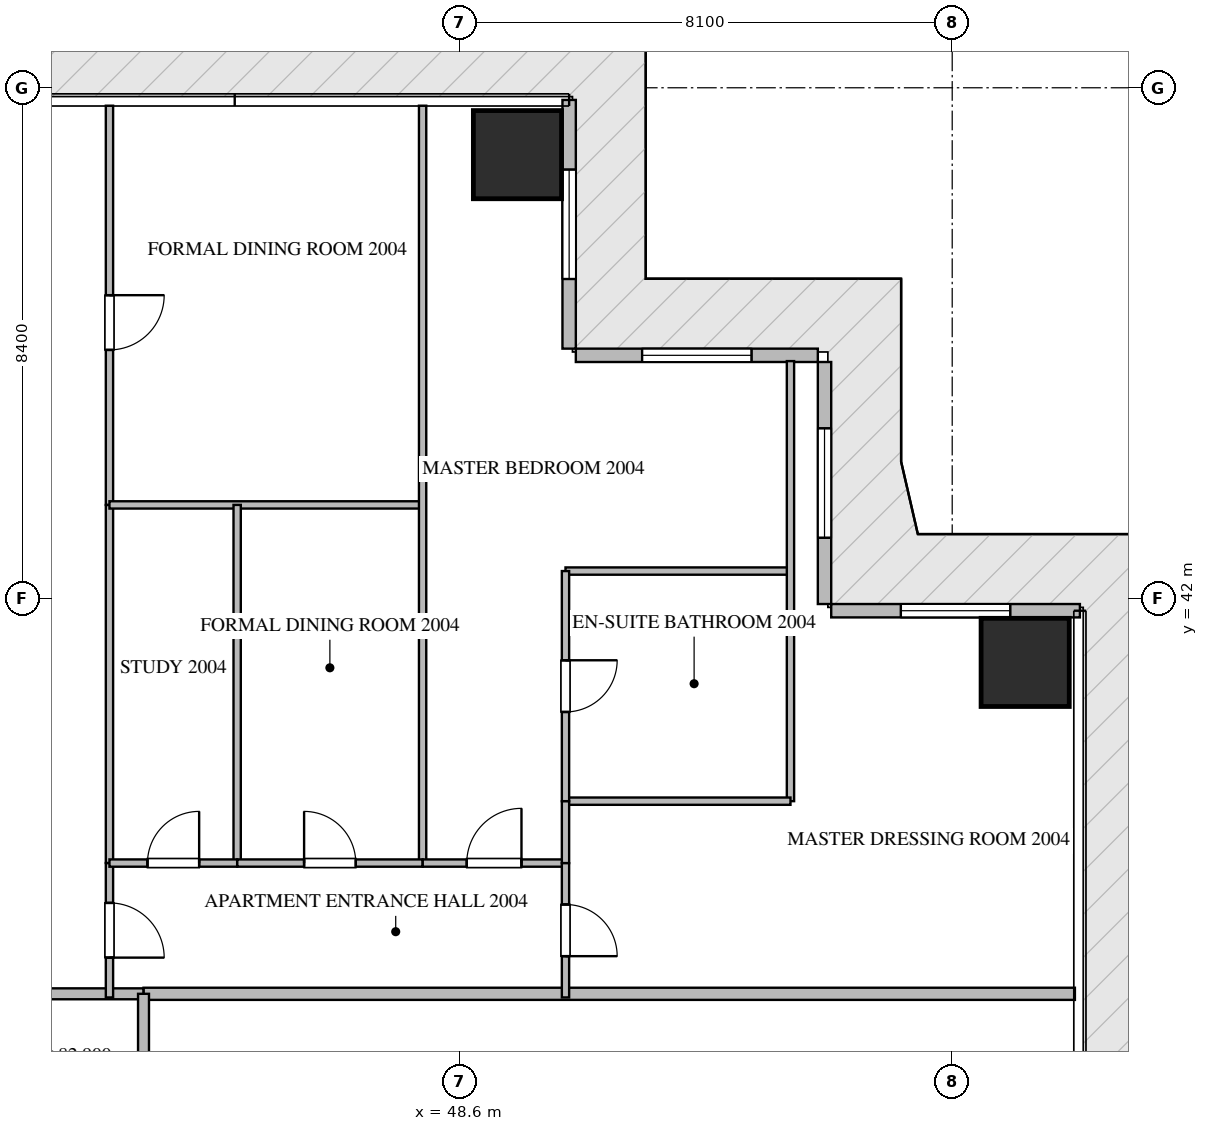
"""IFC4 building model, lengths in metres.
Left out: names, types, materials, properties, quantities, classifications, styles, units other than length and angle.
Written with IfcOpenShell. Run it as: python <this file> out.ifc"""

import sys

from ifc_helpers import new_model, si_unit, direction, frame, frame_2d, origin, origin_2d, place, context, subcontext, project, spatial, rectangle, extrude, source, transform, mapped, element, fill, save


model = new_model("IFC4")
c1 = context("Model", 3, precision=1e-05, world=origin(), true_north=direction((0.0, 1.0)))
c2 = subcontext(c1, "Body", "Model", "MODEL_VIEW")
j1 = project(units=[si_unit("LENGTHUNIT", "METRE"), si_unit("PLANEANGLEUNIT", "RADIAN")], contexts=[c1])
p1 = place(None, origin())
s1 = spatial("IfcSite", under=j1, at=p1, CompositionType="ELEMENT")
p2 = place(p1, origin())
s2 = spatial("IfcBuilding", under=s1, at=p2, CompositionType="ELEMENT")
p3 = place(p2, frame((0.0, 0.0, 82.95)))
s3 = spatial("IfcBuildingStorey", under=s2, at=p3, CompositionType="ELEMENT", Elevation=82.95)
m1 = source(origin(), c2, "Body", "SweptSolid", [
    extrude(rectangle(XDim=1.45, YDim=1.45, at=origin_2d()), origin(), (0.0, 0.0, 1.0), 3.75),
])
for number, where, z_axis, x_axis in (
    (1, (49.55, 49.3, -0.26), (0.0, 0.0, 1.0), (1.0, 0.0, 0.0)),
    (2, (57.9, 40.95, -0.26), (0.0, 0.0, 1.0), (1.0, 0.0, 0.0)),
):
    element("IfcColumn", number, at=place(p3, frame(where, z_axis=z_axis, x_axis=x_axis)), inside=s3, PredefinedType="COLUMN", context=c2, shape_type="MappedRepresentation", body=[
        mapped(m1, transform((0.0, 0.0, 0.0), scale=1.0)),
    ])
p4 = place(p3, frame((58.8, 41.8, 0.0), z_axis=(0.0, 0.0, 1.0), x_axis=(-1.0, 0.0, 0.0)))
e3 = element("IfcWall", 3, at=p4, inside=s3, PredefinedType="ELEMENTEDWALL", context=c2, shape_type="SweptSolid", body=[
    extrude(rectangle(XDim=4.09, YDim=0.22, at=frame_2d((2.045, 0.0))), origin(), (0.0, 0.0, 1.0), 3.475),
])
p5 = place(p4, frame((1.145, 0.0, 0.65)))
e4 = element("IfcOpeningElement", 4, at=p5, cuts=e3, PredefinedType="OPENING", context=c2, shape_type="SweptSolid", body=[
    extrude(rectangle(XDim=1.8, YDim=2.1, at=frame_2d((0.9, 1.05))), frame((0.0, 0.12, 0.0), z_axis=(0.0, -1.0, 0.0), x_axis=(1.0, 0.0, 0.0)), (0.0, 0.0, 1.0), 0.24),
])
p6 = place(p3, frame((54.6, 41.91, 0.0), z_axis=(0.0, 0.0, 1.0), x_axis=(0.0, 1.0, 0.0)))
e5 = element("IfcWall", 5, at=p6, inside=s3, PredefinedType="ELEMENTEDWALL", context=c2, shape_type="SweptSolid", body=[
    extrude(rectangle(XDim=3.98, YDim=0.22, at=frame_2d((1.99, 0.0))), origin(), (0.0, 0.0, 1.0), 3.475),
])
p7 = place(p6, frame((1.09, 0.0, 0.65)))
e6 = element("IfcOpeningElement", 6, at=p7, cuts=e5, PredefinedType="OPENING", context=c2, shape_type="SweptSolid", body=[
    extrude(rectangle(XDim=1.8, YDim=2.1, at=frame_2d((0.9, 1.05))), frame((0.0, 0.12, 0.0), z_axis=(0.0, -1.0, 0.0), x_axis=(1.0, 0.0, 0.0)), (0.0, 0.0, 1.0), 0.24),
])
p8 = place(p3, frame((54.49, 46.0, 0.0), z_axis=(0.0, 0.0, 1.0), x_axis=(-1.0, 0.0, 0.0)))
e7 = element("IfcWall", 7, at=p8, inside=s3, PredefinedType="ELEMENTEDWALL", context=c2, shape_type="SweptSolid", body=[
    extrude(rectangle(XDim=3.98, YDim=0.22, at=frame_2d((1.99, 0.0))), origin(), (0.0, 0.0, 1.0), 3.475),
])
p9 = place(p8, frame((1.09, 0.0, 0.65)))
e8 = element("IfcOpeningElement", 8, at=p9, cuts=e7, PredefinedType="OPENING", context=c2, shape_type="SweptSolid", body=[
    extrude(rectangle(XDim=1.8, YDim=2.1, at=frame_2d((0.9, 1.05))), frame((0.0, 0.12, 0.0), z_axis=(0.0, -1.0, 0.0), x_axis=(1.0, 0.0, 0.0)), (0.0, 0.0, 1.0), 0.24),
])
p10 = place(p3, frame((50.4, 46.11, 0.0), z_axis=(0.0, 0.0, 1.0), x_axis=(0.0, 1.0, 0.0)))
e9 = element("IfcWall", 9, at=p10, inside=s3, PredefinedType="ELEMENTEDWALL", context=c2, shape_type="SweptSolid", body=[
    extrude(rectangle(XDim=4.09, YDim=0.22, at=frame_2d((2.045, 0.0))), origin(), (0.0, 0.0, 1.0), 3.475),
])
p11 = place(p10, frame((1.145, 0.0, 0.65)))
e10 = element("IfcOpeningElement", 10, at=p11, cuts=e9, PredefinedType="OPENING", context=c2, shape_type="SweptSolid", body=[
    extrude(rectangle(XDim=1.8, YDim=2.1, at=frame_2d((0.9, 1.05))), frame((0.0, 0.12, 0.0), z_axis=(0.0, -1.0, 0.0), x_axis=(1.0, 0.0, 0.0)), (0.0, 0.0, 1.0), 0.24),
])
p12 = place(p3, frame((43.4, 35.5, 0.0), z_axis=(0.0, 0.0, 1.0), x_axis=(1.0, 0.0, 0.0)))
e11 = element("IfcWall", 11, at=p12, inside=s3, PredefinedType="PARTITIONING", context=c2, shape_type="SweptSolid", body=[
    extrude(rectangle(XDim=15.318, YDim=0.2, at=frame_2d((7.659, 0.0))), origin(), (0.0, 0.0, 1.0), 3.49),
])
p13 = place(p3, frame((21.402, 35.5, 0.0), z_axis=(0.0, 0.0, 1.0), x_axis=(1.0, 0.0, 0.0)))
e12 = element("IfcWall", 12, at=p13, inside=s3, PredefinedType="PARTITIONING", context=c2, shape_type="SweptSolid", body=[
    extrude(rectangle(XDim=21.996, YDim=0.18, at=frame_2d((10.998, 0.0))), origin(), (0.0, 0.0, 1.0), 3.49),
])
p14 = place(p13, frame((4.724, 0.0, 0.0)))
e13 = element("IfcOpeningElement", 13, at=p14, cuts=e12, PredefinedType="OPENING", context=c2, shape_type="SweptSolid", body=[
    extrude(rectangle(XDim=1.0, YDim=2.15, at=frame_2d((0.5, 1.075))), frame((0.0, 0.1, 0.0), z_axis=(0.0, -1.0, 0.0), x_axis=(1.0, 0.0, 0.0)), (0.0, 0.0, 1.0), 0.2),
])
p15 = place(p13, frame((18.77, 0.0, 0.0)))
e14 = element("IfcOpeningElement", 14, at=p15, cuts=e12, PredefinedType="OPENING", context=c2, shape_type="SweptSolid", body=[
    extrude(rectangle(XDim=1.0, YDim=2.15, at=frame_2d((0.5, 1.075))), frame((0.0, 0.1, 0.0), z_axis=(0.0, -1.0, 0.0), x_axis=(1.0, 0.0, 0.0)), (0.0, 0.0, 1.0), 0.2),
])
p16 = place(p3, frame((43.4, 14.9, 0.0), z_axis=(0.0, 0.0, 1.0), x_axis=(0.0, 1.0, 0.0)))
e15 = element("IfcWall", 15, at=p16, inside=s3, PredefinedType="PARTITIONING", context=c2, shape_type="SweptSolid", body=[
    extrude(rectangle(XDim=20.6, YDim=0.18, at=frame_2d((10.3, 0.0))), origin(), (0.0, 0.0, 1.0), 3.49),
])
p17 = place(p16, frame((1.82, 0.0, 0.0)))
e16 = element("IfcOpeningElement", 16, at=p17, cuts=e15, PredefinedType="OPENING", context=c2, shape_type="SweptSolid", body=[
    extrude(rectangle(XDim=1.0, YDim=2.15, at=frame_2d((0.5, 1.075))), frame((0.0, 0.1, 0.0), z_axis=(0.0, -1.0, 0.0), x_axis=(1.0, 0.0, 0.0)), (0.0, 0.0, 1.0), 0.2),
])
p18 = place(p16, frame((11.368, 0.0, 0.0)))
e17 = element("IfcOpeningElement", 17, at=p18, cuts=e15, PredefinedType="OPENING", context=c2, shape_type="SweptSolid", body=[
    extrude(rectangle(XDim=1.0, YDim=2.15, at=frame_2d((0.5, 1.075))), frame((0.0, 0.1, 0.0), z_axis=(0.0, -1.0, 0.0), x_axis=(1.0, 0.0, 0.0)), (0.0, 0.0, 1.0), 0.2),
])
p19 = place(p16, frame((18.06, 0.0, 0.0)))
e18 = element("IfcOpeningElement", 18, at=p19, cuts=e15, PredefinedType="OPENING", context=c2, shape_type="SweptSolid", body=[
    extrude(rectangle(XDim=1.0, YDim=2.15, at=frame_2d((0.5, 1.075))), frame((0.0, 0.1, 0.0), z_axis=(0.0, -1.0, 0.0), x_axis=(1.0, 0.0, 0.0)), (0.0, 0.0, 1.0), 0.2),
])
p20 = place(p3, frame((42.84, 37.65, 0.0), z_axis=(0.0, 0.0, 1.0), x_axis=(0.0, -1.0, 0.0)))
e19 = element("IfcWall", 19, at=p20, inside=s3, PredefinedType="PARTITIONING", context=c2, shape_type="SweptSolid", body=[
    extrude(rectangle(XDim=2.21, YDim=0.12, at=frame_2d((1.105, 0.0))), origin(), (0.0, 0.0, 1.0), 3.49),
])
p21 = place(p20, frame((0.655, 0.0, 0.0)))
e20 = element("IfcOpeningElement", 20, at=p21, cuts=e19, PredefinedType="OPENING", context=c2, shape_type="SweptSolid", body=[
    extrude(rectangle(XDim=0.9, YDim=2.1, at=frame_2d((0.45, 1.05))), frame((0.0, 0.07, 0.0), z_axis=(0.0, -1.0, 0.0), x_axis=(1.0, 0.0, 0.0)), (0.0, 0.0, 1.0), 0.14),
])
p22 = place(p3, frame((42.84, 50.105, 0.0), z_axis=(0.0, 0.0, 1.0), x_axis=(0.0, -1.0, 0.0)))
e21 = element("IfcWall", 21, at=p22, inside=s3, PredefinedType="PARTITIONING", context=c2, shape_type="SweptSolid", body=[
    extrude(rectangle(XDim=6.565, YDim=0.12, at=frame_2d((3.282, 0.0))), origin(), (0.0, 0.0, 1.0), 3.49),
])
p23 = place(p22, frame((3.116, 0.0, 0.0)))
e22 = element("IfcOpeningElement", 22, at=p23, cuts=e21, PredefinedType="OPENING", context=c2, shape_type="SweptSolid", body=[
    extrude(rectangle(XDim=0.9, YDim=2.1, at=frame_2d((0.45, 1.05))), frame((0.0, 0.07, 0.0), z_axis=(0.0, -1.0, 0.0), x_axis=(1.0, 0.0, 0.0)), (0.0, 0.0, 1.0), 0.14),
])
p24 = place(p3, frame((42.84, 43.538, 0.0), z_axis=(0.0, 0.0, 1.0), x_axis=(0.0, -1.0, 0.0)))
e23 = element("IfcWall", 23, at=p24, inside=s3, PredefinedType="PARTITIONING", context=c2, shape_type="SweptSolid", body=[
    extrude(rectangle(XDim=5.886, YDim=0.12, at=frame_2d((2.943, 0.0))), origin(), (0.0, 0.0, 1.0), 3.49),
])
p25 = place(p3, frame((42.84, 43.54, 0.0), z_axis=(0.0, 0.0, 1.0), x_axis=(1.0, 0.0, 0.0)))
e24 = element("IfcWall", 24, at=p25, inside=s3, PredefinedType="PARTITIONING", context=c2, shape_type="SweptSolid", body=[
    extrude(rectangle(XDim=5.15, YDim=0.12, at=frame_2d((2.575, 0.0))), origin(), (0.0, 0.0, 1.0), 3.49),
])
p26 = place(p3, frame((47.99, 50.105, 0.0), z_axis=(0.0, 0.0, 1.0), x_axis=(0.0, -1.0, 0.0)))
e25 = element("IfcWall", 25, at=p26, inside=s3, PredefinedType="PARTITIONING", context=c2, shape_type="SweptSolid", body=[
    extrude(rectangle(XDim=12.455, YDim=0.12, at=frame_2d((6.228, 0.0))), origin(), (0.0, 0.0, 1.0), 3.49),
])
p27 = place(p3, frame((44.94, 43.54, 0.0), z_axis=(0.0, 0.0, 1.0), x_axis=(0.0, -1.0, 0.0)))
e26 = element("IfcWall", 26, at=p27, inside=s3, PredefinedType="PARTITIONING", context=c2, shape_type="SweptSolid", body=[
    extrude(rectangle(XDim=5.89, YDim=0.12, at=frame_2d((2.945, 0.0))), origin(), (0.0, 0.0, 1.0), 3.49),
])
p28 = place(p3, frame((42.84, 37.65, 0.0), z_axis=(0.0, 0.0, 1.0), x_axis=(1.0, 0.0, 0.0)))
e27 = element("IfcWall", 27, at=p28, inside=s3, PredefinedType="PARTITIONING", context=c2, shape_type="SweptSolid", body=[
    extrude(rectangle(XDim=2.1, YDim=0.12, at=frame_2d((1.05, 0.0))), origin(), (0.0, 0.0, 1.0), 3.49),
])
p29 = place(p28, frame((0.625, 0.0, 0.0)))
e28 = element("IfcOpeningElement", 28, at=p29, cuts=e27, PredefinedType="OPENING", context=c2, shape_type="SweptSolid", body=[
    extrude(rectangle(XDim=0.85, YDim=2.1, at=frame_2d((0.425, 1.05))), frame((0.0, 0.07, 0.0), z_axis=(0.0, -1.0, 0.0), x_axis=(1.0, 0.0, 0.0)), (0.0, 0.0, 1.0), 0.14),
])
p30 = place(p3, frame((44.942, 37.65, 0.0), z_axis=(0.0, 0.0, 1.0), x_axis=(1.0, 0.0, 0.0)))
e29 = element("IfcWall", 29, at=p30, inside=s3, PredefinedType="PARTITIONING", context=c2, shape_type="SweptSolid", body=[
    extrude(rectangle(XDim=3.048, YDim=0.12, at=frame_2d((1.524, 0.0))), origin(), (0.0, 0.0, 1.0), 3.49),
])
p31 = place(p30, frame((1.099, 0.0, 0.0)))
e30 = element("IfcOpeningElement", 30, at=p31, cuts=e29, PredefinedType="OPENING", context=c2, shape_type="SweptSolid", body=[
    extrude(rectangle(XDim=0.85, YDim=2.1, at=frame_2d((0.425, 1.05))), frame((0.0, 0.07, 0.0), z_axis=(0.0, -1.0, 0.0), x_axis=(1.0, 0.0, 0.0)), (0.0, 0.0, 1.0), 0.14),
])
p32 = place(p3, frame((47.992, 37.65, 0.0), z_axis=(0.0, 0.0, 1.0), x_axis=(1.0, 0.0, 0.0)))
e31 = element("IfcWall", 31, at=p32, inside=s3, PredefinedType="PARTITIONING", context=c2, shape_type="SweptSolid", body=[
    extrude(rectangle(XDim=2.348, YDim=0.12, at=frame_2d((1.174, 0.0))), origin(), (0.0, 0.0, 1.0), 3.49),
])
p33 = place(p32, frame((0.724, 0.0, 0.0)))
e32 = element("IfcOpeningElement", 32, at=p33, cuts=e31, PredefinedType="OPENING", context=c2, shape_type="SweptSolid", body=[
    extrude(rectangle(XDim=0.9, YDim=2.1, at=frame_2d((0.45, 1.05))), frame((0.0, 0.07, 0.0), z_axis=(0.0, -1.0, 0.0), x_axis=(1.0, 0.0, 0.0)), (0.0, 0.0, 1.0), 0.14),
])
p34 = place(p3, frame((50.34, 42.452, 0.0), z_axis=(0.0, 0.0, 1.0), x_axis=(1.0, 0.0, 0.0)))
e33 = element("IfcWall", 33, at=p34, inside=s3, PredefinedType="PARTITIONING", context=c2, shape_type="SweptSolid", body=[
    extrude(rectangle(XDim=3.7, YDim=0.12, at=frame_2d((1.85, 0.0))), origin(), (0.0, 0.0, 1.0), 3.49),
])
p35 = place(p3, frame((54.04, 45.905, 0.0), z_axis=(0.0, 0.0, 1.0), x_axis=(0.0, -1.0, 0.0)))
e34 = element("IfcWall", 34, at=p35, inside=s3, PredefinedType="PARTITIONING", context=c2, shape_type="SweptSolid", body=[
    extrude(rectangle(XDim=7.237, YDim=0.12, at=frame_2d((3.619, 0.0))), origin(), (0.0, 0.0, 1.0), 3.49),
])
p36 = place(p3, frame((50.34, 38.668, 0.0), z_axis=(0.0, 0.0, 1.0), x_axis=(1.0, 0.0, 0.0)))
e35 = element("IfcWall", 35, at=p36, inside=s3, PredefinedType="PARTITIONING", context=c2, shape_type="SweptSolid", body=[
    extrude(rectangle(XDim=3.7, YDim=0.12, at=frame_2d((1.85, 0.0))), origin(), (0.0, 0.0, 1.0), 3.49),
])
p37 = place(p3, frame((50.34, 42.452, 0.0), z_axis=(0.0, 0.0, 1.0), x_axis=(0.0, -1.0, 0.0)))
e36 = element("IfcWall", 36, at=p37, inside=s3, PredefinedType="PARTITIONING", context=c2, shape_type="SweptSolid", body=[
    extrude(rectangle(XDim=3.784, YDim=0.12, at=frame_2d((1.892, 0.0))), origin(), (0.0, 0.0, 1.0), 3.49),
])
p38 = place(p37, frame((1.467, 0.0, 0.0)))
e37 = element("IfcOpeningElement", 37, at=p38, cuts=e36, PredefinedType="OPENING", context=c2, shape_type="SweptSolid", body=[
    extrude(rectangle(XDim=0.85, YDim=2.1, at=frame_2d((0.425, 1.05))), frame((0.0, 0.07, 0.0), z_axis=(0.0, -1.0, 0.0), x_axis=(1.0, 0.0, 0.0)), (0.0, 0.0, 1.0), 0.14),
])
p39 = place(p3, frame((50.34, 38.666, 0.0), z_axis=(0.0, 0.0, 1.0), x_axis=(0.0, -1.0, 0.0)))
e38 = element("IfcWall", 38, at=p39, inside=s3, PredefinedType="PARTITIONING", context=c2, shape_type="SweptSolid", body=[
    extrude(rectangle(XDim=1.016, YDim=0.12, at=frame_2d((0.508, 0.0))), origin(), (0.0, 0.0, 1.0), 3.49),
])
p40 = place(p3, frame((50.34, 37.648, 0.0), z_axis=(0.0, 0.0, 1.0), x_axis=(0.0, -1.0, 0.0)))
e39 = element("IfcWall", 39, at=p40, inside=s3, PredefinedType="PARTITIONING", context=c2, shape_type="SweptSolid", body=[
    extrude(rectangle(XDim=2.208, YDim=0.12, at=frame_2d((1.104, 0.0))), origin(), (0.0, 0.0, 1.0), 3.49),
])
p41 = place(p40, frame((0.679, 0.0, 0.0)))
e40 = element("IfcOpeningElement", 40, at=p41, cuts=e39, PredefinedType="OPENING", context=c2, shape_type="SweptSolid", body=[
    extrude(rectangle(XDim=0.85, YDim=2.1, at=frame_2d((0.425, 1.05))), frame((0.0, 0.07, 0.0), z_axis=(0.0, -1.0, 0.0), x_axis=(1.0, 0.0, 0.0)), (0.0, 0.0, 1.0), 0.14),
])
m2 = source(origin(), c2, "Body", "SweptSolid", [
    extrude(rectangle(XDim=1.8, YDim=2.1, at=frame_2d((0.9, 1.05))), frame((0.0, 0.03, 0.0), z_axis=(0.0, -1.0, 0.0), x_axis=(1.0, 0.0, 0.0)), (0.0, 0.0, 1.0), 0.06),
])
p42 = place(p5, origin())
e41 = element("IfcWindow", 41, at=p42, inside=s3, PartitioningType="SINGLE_PANEL", PredefinedType="WINDOW", context=c2, shape_type="MappedRepresentation", body=[
    mapped(m2, transform((0.0, 0.0, 0.0), scale=1.0)),
])
fill(e4, e41)
p43 = place(p7, origin())
e42 = element("IfcWindow", 42, at=p43, inside=s3, PartitioningType="SINGLE_PANEL", PredefinedType="WINDOW", context=c2, shape_type="MappedRepresentation", body=[
    mapped(m2, transform((0.0, 0.0, 0.0), scale=1.0)),
])
fill(e6, e42)
p44 = place(p9, origin())
e43 = element("IfcWindow", 43, at=p44, inside=s3, PartitioningType="SINGLE_PANEL", PredefinedType="WINDOW", context=c2, shape_type="MappedRepresentation", body=[
    mapped(m2, transform((0.0, 0.0, 0.0), scale=1.0)),
])
fill(e8, e43)
p45 = place(p11, origin())
e44 = element("IfcWindow", 44, at=p45, inside=s3, PartitioningType="SINGLE_PANEL", PredefinedType="WINDOW", context=c2, shape_type="MappedRepresentation", body=[
    mapped(m2, transform((0.0, 0.0, 0.0), scale=1.0)),
])
fill(e10, e44)
m3 = source(origin(), c2, "Body", "SweptSolid", [
    extrude(rectangle(XDim=0.9, YDim=2.1, at=frame_2d((0.45, 1.05))), frame((0.0, 0.025, 0.0), z_axis=(0.0, -1.0, 0.0), x_axis=(1.0, 0.0, 0.0)), (0.0, 0.0, 1.0), 0.05),
])
p46 = place(p21, origin())
e45 = element("IfcDoor", 45, at=p46, inside=s3, OperationType="SINGLE_SWING_RIGHT", PredefinedType="DOOR", context=c2, shape_type="MappedRepresentation", body=[
    mapped(m3, transform((0.0, 0.0, 0.0), scale=1.0)),
])
fill(e20, e45)
p47 = place(p23, origin())
e46 = element("IfcDoor", 46, at=p47, inside=s3, OperationType="SINGLE_SWING_LEFT", PredefinedType="DOOR", context=c2, shape_type="MappedRepresentation", body=[
    mapped(m3, transform((0.0, 0.0, 0.0), scale=1.0)),
])
fill(e22, e46)
m4 = source(origin(), c2, "Body", "SweptSolid", [
    extrude(rectangle(XDim=0.85, YDim=2.1, at=frame_2d((0.425, 1.05))), frame((0.0, 0.025, 0.0), z_axis=(0.0, -1.0, 0.0), x_axis=(1.0, 0.0, 0.0)), (0.0, 0.0, 1.0), 0.05),
])
p48 = place(p29, origin())
e47 = element("IfcDoor", 47, at=p48, inside=s3, OperationType="SINGLE_SWING_RIGHT", PredefinedType="DOOR", context=c2, shape_type="MappedRepresentation", body=[
    mapped(m4, transform((0.0, 0.0, 0.0), scale=1.0)),
])
fill(e28, e47)
p49 = place(p31, origin())
e48 = element("IfcDoor", 48, at=p49, inside=s3, OperationType="SINGLE_SWING_LEFT", PredefinedType="DOOR", context=c2, shape_type="MappedRepresentation", body=[
    mapped(m4, transform((0.0, 0.0, 0.0), scale=1.0)),
])
fill(e30, e48)
p50 = place(p33, origin())
e49 = element("IfcDoor", 49, at=p50, inside=s3, OperationType="SINGLE_SWING_RIGHT", PredefinedType="DOOR", context=c2, shape_type="MappedRepresentation", body=[
    mapped(m3, transform((0.0, 0.0, 0.0), scale=1.0)),
])
fill(e32, e49)
p51 = place(p38, origin())
e50 = element("IfcDoor", 50, at=p51, inside=s3, OperationType="SINGLE_SWING_LEFT", PredefinedType="DOOR", context=c2, shape_type="MappedRepresentation", body=[
    mapped(m4, transform((0.0, 0.0, 0.0), scale=1.0)),
])
fill(e37, e50)
p52 = place(p41, origin())
e51 = element("IfcDoor", 51, at=p52, inside=s3, OperationType="SINGLE_SWING_RIGHT", PredefinedType="DOOR", context=c2, shape_type="MappedRepresentation", body=[
    mapped(m4, transform((0.0, 0.0, 0.0), scale=1.0)),
])
fill(e40, e51)
save(model, sys.argv[1])
